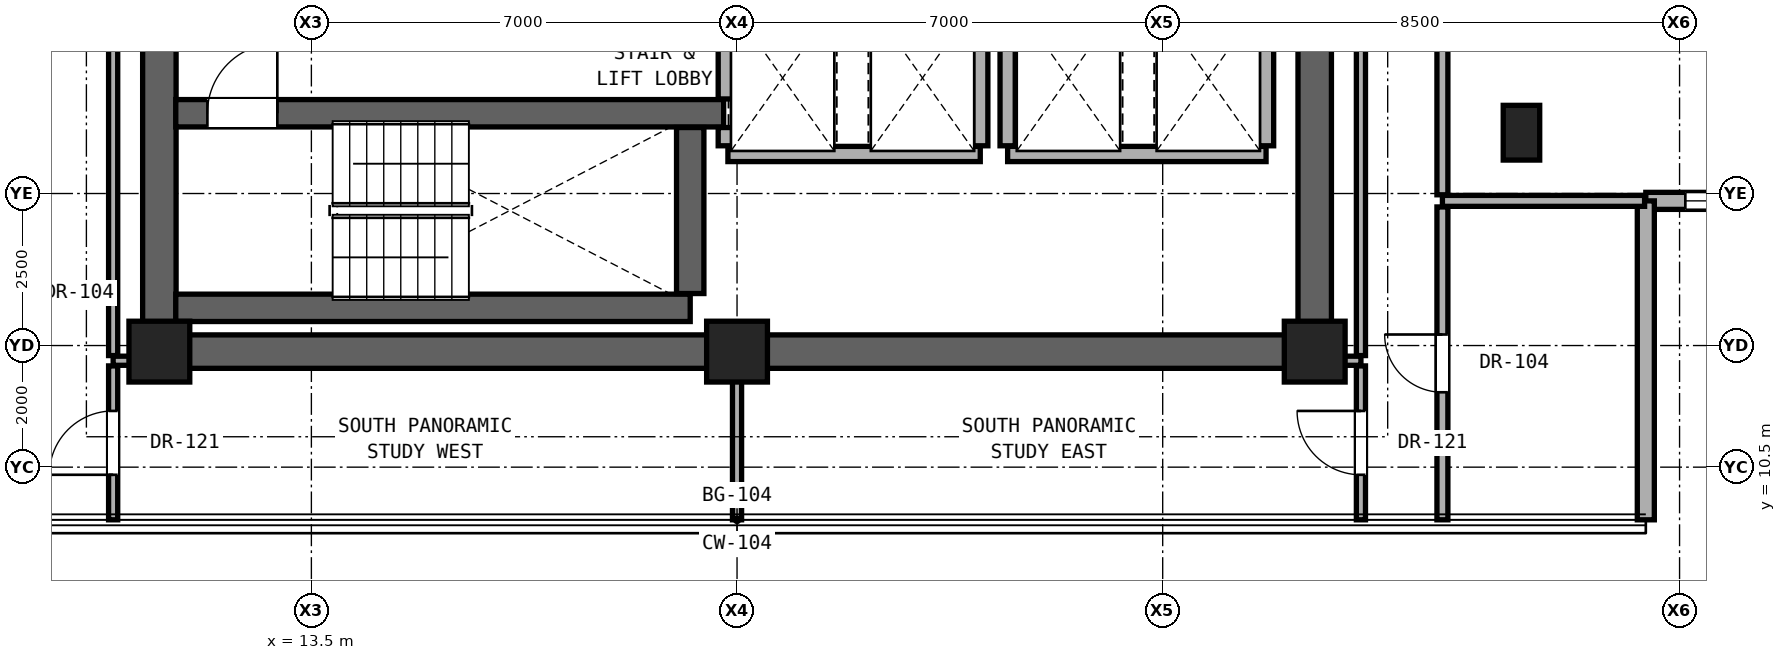
"""IFC4 building model, lengths in metres.
Left out: names, types, materials, properties, quantities, classifications, styles, units other than length and angle.
Written with IfcOpenShell. Run it as: python <this file> out.ifc"""

import sys

from ifc_helpers import new_model, si_unit, direction, frame, frame_2d, origin, origin_2d, place, context, subcontext, project, spatial, rectangle, extrude, element, fill, save


model = new_model("IFC4")
c1 = context("Model", 3, precision=1e-05, world=origin(), true_north=direction((0.0, 1.0)))
c2 = subcontext(c1, "Body", "Model", "MODEL_VIEW")
j1 = project(units=[si_unit("LENGTHUNIT", "METRE"), si_unit("PLANEANGLEUNIT", "RADIAN")], contexts=[c1])
p1 = place(None, origin())
s1 = spatial("IfcSite", under=j1, at=p1, CompositionType="ELEMENT")
p2 = place(p1, origin())
s2 = spatial("IfcBuilding", under=s1, at=p2, CompositionType="ELEMENT")
p3 = place(p2, frame((0.0, 0.0, 160.9)))
s3 = spatial("IfcBuildingStorey", under=s2, at=p3, CompositionType="ELEMENT", Elevation=160.9)
for number, where, z_axis, x_axis in (
    (1, (11.0, 12.4, 0.0), (0.0, 0.0, 1.0), (1.0, 0.0, 0.0)),
    (2, (20.5, 12.4, 0.0), (0.0, 0.0, 1.0), (1.0, 0.0, 0.0)),
    (3, (30.0, 12.4, 0.0), (0.0, 0.0, 1.0), (1.0, 0.0, 0.0)),
):
    element("IfcColumn", number, at=place(p3, frame(where, z_axis=z_axis, x_axis=x_axis)), inside=s3, PredefinedType="COLUMN", context=c2, shape_type="SweptSolid", body=[
        extrude(rectangle(XDim=1.0, YDim=1.0, at=origin_2d()), origin(), (0.0, 0.0, 1.0), 3.25),
    ])
p4 = place(p3, frame((33.4, 16.0, 0.0), z_axis=(0.0, 0.0, 1.0), x_axis=(1.0, 0.0, 0.0)))
e4 = element("IfcColumn", 4, at=p4, inside=s3, PredefinedType="PILASTER", context=c2, shape_type="SweptSolid", body=[
    extrude(rectangle(XDim=0.6, YDim=0.9, at=origin_2d()), origin(), (0.0, 0.0, 1.0), 3.25),
])
p5 = place(p3, frame((11.0, 12.4, 0.0), z_axis=(0.0, 0.0, 1.0), x_axis=(1.0, 0.0, 0.0)))
e5 = element("IfcWall", 5, at=p5, inside=s3, PredefinedType="SHEAR", context=c2, shape_type="SweptSolid", body=[
    extrude(rectangle(XDim=19.0, YDim=0.55, at=frame_2d((9.5, 0.0))), origin(), (0.0, 0.0, 1.0), 3.05),
])
for number, where, z_axis, x_axis in (
    (6, (11.0, 12.4, 0.0), (0.0, 0.0, 1.0), (0.0, 1.0, 0.0)),
    (7, (30.0, 12.4, 0.0), (0.0, 0.0, 1.0), (0.0, 1.0, 0.0)),
):
    element("IfcWall", number, at=place(p3, frame(where, z_axis=z_axis, x_axis=x_axis)), inside=s3, PredefinedType="SHEAR", context=c2, shape_type="SweptSolid", body=[
        extrude(rectangle(XDim=6.0, YDim=0.55, at=frame_2d((3.0, 0.0))), origin(), (0.0, 0.0, 1.0), 3.05),
    ])
p6 = place(p3, frame((35.445, 14.879, 0.0), z_axis=(0.0, 0.0, 1.0), x_axis=(1.0, 0.0, 0.0)))
e8 = element("IfcWall", 8, at=p6, inside=s3, PredefinedType="SOLIDWALL", context=c2, shape_type="SweptSolid", body=[
    extrude(rectangle(XDim=5.245, YDim=0.28, at=frame_2d((2.623, 0.0))), origin(), (0.0, 0.0, 1.0), 3.03),
])
p7 = place(p6, frame((0.65, 0.0, 0.85)))
e9 = element("IfcOpeningElement", 9, at=p7, cuts=e8, PredefinedType="OPENING", context=c2, shape_type="SweptSolid", body=[
    extrude(rectangle(XDim=1.1, YDim=2.0, at=frame_2d((0.55, 1.0))), frame((0.0, 0.15, 0.0), z_axis=(0.0, -1.0, 0.0), x_axis=(1.0, 0.0, 0.0)), (0.0, 0.0, 1.0), 0.3),
])
p8 = place(p3, frame((35.445, 9.634, 0.0), z_axis=(0.0, 0.0, 1.0), x_axis=(0.0, 1.0, 0.0)))
e10 = element("IfcWall", 10, at=p8, inside=s3, PredefinedType="SOLIDWALL", context=c2, shape_type="SweptSolid", body=[
    extrude(rectangle(XDim=5.245, YDim=0.28, at=frame_2d((2.623, 0.0))), origin(), (0.0, 0.0, 1.0), 3.03),
])
for number, where, z_axis, x_axis in (
    (11, (10.24, 12.25, 0.0), (0.0, 0.0, 1.0), (1.0, 0.0, 0.0)),
    (12, (30.27, 12.25, 0.0), (0.0, 0.0, 1.0), (1.0, 0.0, 0.0)),
):
    element("IfcWall", number, at=place(p3, frame(where, z_axis=z_axis, x_axis=x_axis)), inside=s3, PredefinedType="PARTITIONING", context=c2, shape_type="SweptSolid", body=[
        extrude(rectangle(XDim=0.49, YDim=0.15, at=frame_2d((0.245, 0.0))), origin(), (0.0, 0.0, 1.0), 3.05),
    ])
p9 = place(p3, frame((11.27, 13.12, 0.0), z_axis=(0.0, 0.0, 1.0), x_axis=(1.0, 0.0, 0.0)))
e13 = element("IfcWall", 13, at=p9, inside=s3, PredefinedType="SHEAR", context=c2, shape_type="SweptSolid", body=[
    extrude(rectangle(XDim=8.46, YDim=0.45, at=frame_2d((4.23, 0.0))), origin(), (0.0, 0.0, 1.0), 3.05),
])
p10 = place(p3, frame((32.1, 14.879, 0.0), z_axis=(0.0, 0.0, 1.0), x_axis=(1.0, 0.0, 0.0)))
e14 = element("IfcWall", 14, at=p10, inside=s3, PredefinedType="PARTITIONING", context=c2, shape_type="SweptSolid", body=[
    extrude(rectangle(XDim=3.325, YDim=0.18, at=frame_2d((1.663, 0.0))), origin(), (0.0, 0.0, 1.0), 3.05),
])
p11 = place(p3, frame((20.35, 15.65, 0.0), z_axis=(0.0, 0.0, 1.0), x_axis=(1.0, 0.0, 0.0)))
e15 = element("IfcWall", 15, at=p11, inside=s3, PredefinedType="SOLIDWALL", context=c2, shape_type="SweptSolid", body=[
    extrude(rectangle(XDim=4.15, YDim=0.25, at=frame_2d((2.075, 0.0))), origin(), (0.0, 0.0, 1.0), 3.05),
])
p12 = place(p3, frame((24.95, 15.65, 0.0), z_axis=(0.0, 0.0, 1.0), x_axis=(1.0, 0.0, 0.0)))
e16 = element("IfcWall", 16, at=p12, inside=s3, PredefinedType="SOLIDWALL", context=c2, shape_type="SweptSolid", body=[
    extrude(rectangle(XDim=4.25, YDim=0.25, at=frame_2d((2.125, 0.0))), origin(), (0.0, 0.0, 1.0), 3.05),
])
p13 = place(p3, frame((11.27, 16.32, 0.0), z_axis=(0.0, 0.0, 1.0), x_axis=(1.0, 0.0, 0.0)))
e17 = element("IfcWall", 17, at=p13, inside=s3, PredefinedType="SHEAR", context=c2, shape_type="SweptSolid", body=[
    extrude(rectangle(XDim=9.01, YDim=0.45, at=frame_2d((4.505, 0.0))), origin(), (0.0, 0.0, 1.0), 3.05),
])
p14 = place(p13, frame((0.52, 0.0, 0.0)))
e18 = element("IfcOpeningElement", 18, at=p14, cuts=e17, PredefinedType="OPENING", context=c2, shape_type="SweptSolid", body=[
    extrude(rectangle(XDim=1.15, YDim=2.2, at=frame_2d((0.575, 1.1))), frame((0.0, 0.235, 0.0), z_axis=(0.0, -1.0, 0.0), x_axis=(1.0, 0.0, 0.0)), (0.0, 0.0, 1.0), 0.47),
])
p15 = place(p3, frame((10.24, 9.634, 0.0), z_axis=(0.0, 0.0, 1.0), x_axis=(0.0, 1.0, 0.0)))
e19 = element("IfcWall", 19, at=p15, inside=s3, PredefinedType="PARTITIONING", context=c2, shape_type="SweptSolid", body=[
    extrude(rectangle(XDim=2.531, YDim=0.15, at=frame_2d((1.266, 0.0))), origin(), (0.0, 0.0, 1.0), 3.05),
])
p16 = place(p15, frame((0.74, 0.0, 0.0)))
e20 = element("IfcOpeningElement", 20, at=p16, cuts=e19, PredefinedType="OPENING", context=c2, shape_type="SweptSolid", body=[
    extrude(rectangle(XDim=1.05, YDim=2.2, at=frame_2d((0.525, 1.1))), frame((0.0, 0.085, 0.0), z_axis=(0.0, -1.0, 0.0), x_axis=(1.0, 0.0, 0.0)), (0.0, 0.0, 1.0), 0.17),
])
p17 = place(p3, frame((10.24, 12.335, 0.0), z_axis=(0.0, 0.0, 1.0), x_axis=(0.0, 1.0, 0.0)))
e21 = element("IfcWall", 21, at=p17, inside=s3, PredefinedType="PARTITIONING", context=c2, shape_type="SweptSolid", body=[
    extrude(rectangle(XDim=5.98, YDim=0.15, at=frame_2d((2.99, 0.0))), origin(), (0.0, 0.0, 1.0), 2.442),
])
p18 = place(p3, frame((19.73, 13.355, 0.0), z_axis=(0.0, 0.0, 1.0), x_axis=(0.0, 1.0, 0.0)))
e22 = element("IfcWall", 22, at=p18, inside=s3, PredefinedType="SHEAR", context=c2, shape_type="SweptSolid", body=[
    extrude(rectangle(XDim=2.73, YDim=0.45, at=frame_2d((1.365, 0.0))), origin(), (0.0, 0.0, 1.0), 3.05),
])
p19 = place(p3, frame((20.315, 15.785, 0.0), z_axis=(0.0, 0.0, 1.0), x_axis=(0.0, 1.0, 0.0)))
e23 = element("IfcWall", 23, at=p19, inside=s3, PredefinedType="SOLIDWALL", context=c2, shape_type="SweptSolid", body=[
    extrude(rectangle(XDim=0.3, YDim=0.25, at=frame_2d((0.15, 0.0))), origin(), (0.0, 0.0, 1.0), 3.05),
])
p20 = place(p3, frame((20.315, 16.555, 0.0), z_axis=(0.0, 0.0, 1.0), x_axis=(0.0, 1.0, 0.0)))
e24 = element("IfcWall", 24, at=p20, inside=s3, PredefinedType="SOLIDWALL", context=c2, shape_type="SweptSolid", body=[
    extrude(rectangle(XDim=1.575, YDim=0.25, at=frame_2d((0.788, 0.0))), origin(), (0.0, 0.0, 1.0), 3.05),
])
p21 = place(p3, frame((20.5, 9.634, 0.0), z_axis=(0.0, 0.0, 1.0), x_axis=(0.0, 1.0, 0.0)))
e25 = element("IfcWall", 25, at=p21, inside=s3, PredefinedType="PARTITIONING", context=c2, shape_type="SweptSolid", body=[
    extrude(rectangle(XDim=2.496, YDim=0.15, at=frame_2d((1.248, 0.0))), origin(), (0.0, 0.0, 1.0), 3.05),
])
for number, where, z_axis, x_axis in (
    (26, (24.5, 15.785, 0.0), (0.0, 0.0, 1.0), (0.0, 1.0, 0.0)),
    (27, (24.95, 15.785, 0.0), (0.0, 0.0, 1.0), (0.0, 1.0, 0.0)),
    (28, (29.2, 15.785, 0.0), (0.0, 0.0, 1.0), (0.0, 1.0, 0.0)),
):
    element("IfcWall", number, at=place(p3, frame(where, z_axis=z_axis, x_axis=x_axis)), inside=s3, PredefinedType="SOLIDWALL", context=c2, shape_type="SweptSolid", body=[
        extrude(rectangle(XDim=2.345, YDim=0.25, at=frame_2d((1.172, 0.0))), origin(), (0.0, 0.0, 1.0), 3.05),
    ])
p22 = place(p3, frame((30.76, 9.634, 0.0), z_axis=(0.0, 0.0, 1.0), x_axis=(0.0, 1.0, 0.0)))
e29 = element("IfcWall", 29, at=p22, inside=s3, PredefinedType="PARTITIONING", context=c2, shape_type="SweptSolid", body=[
    extrude(rectangle(XDim=2.531, YDim=0.15, at=frame_2d((1.266, 0.0))), origin(), (0.0, 0.0, 1.0), 3.05),
])
p23 = place(p22, frame((0.74, 0.0, 0.0)))
e30 = element("IfcOpeningElement", 30, at=p23, cuts=e29, PredefinedType="OPENING", context=c2, shape_type="SweptSolid", body=[
    extrude(rectangle(XDim=1.05, YDim=2.2, at=frame_2d((0.525, 1.1))), frame((0.0, 0.085, 0.0), z_axis=(0.0, -1.0, 0.0), x_axis=(1.0, 0.0, 0.0)), (0.0, 0.0, 1.0), 0.17),
])
p24 = place(p3, frame((30.76, 12.335, 0.0), z_axis=(0.0, 0.0, 1.0), x_axis=(0.0, 1.0, 0.0)))
e31 = element("IfcWall", 31, at=p24, inside=s3, PredefinedType="PARTITIONING", context=c2, shape_type="SweptSolid", body=[
    extrude(rectangle(XDim=5.98, YDim=0.15, at=frame_2d((2.99, 0.0))), origin(), (0.0, 0.0, 1.0), 2.442),
])
p25 = place(p3, frame((32.1, 9.634, 0.0), z_axis=(0.0, 0.0, 1.0), x_axis=(0.0, 1.0, 0.0)))
e32 = element("IfcWall", 32, at=p25, inside=s3, PredefinedType="PARTITIONING", context=c2, shape_type="SweptSolid", body=[
    extrude(rectangle(XDim=5.145, YDim=0.18, at=frame_2d((2.573, 0.0))), origin(), (0.0, 0.0, 1.0), 3.05),
])
p26 = place(p25, frame((2.097, 0.0, 0.0)))
e33 = element("IfcOpeningElement", 33, at=p26, cuts=e32, PredefinedType="OPENING", context=c2, shape_type="SweptSolid", body=[
    extrude(rectangle(XDim=0.95, YDim=2.15, at=frame_2d((0.475, 1.075))), frame((0.0, 0.1, 0.0), z_axis=(0.0, -1.0, 0.0), x_axis=(1.0, 0.0, 0.0)), (0.0, 0.0, 1.0), 0.2),
])
p27 = place(p3, frame((32.1, 14.979, 0.0), z_axis=(0.0, 0.0, 1.0), x_axis=(0.0, 1.0, 0.0)))
e34 = element("IfcWall", 34, at=p27, inside=s3, PredefinedType="PARTITIONING", context=c2, shape_type="SweptSolid", body=[
    extrude(rectangle(XDim=7.421, YDim=0.18, at=frame_2d((3.71, 0.0))), origin(), (0.0, 0.0, 1.0), 2.442),
])
p28 = place(p27, frame((3.186, 0.0, 0.0)))
e35 = element("IfcOpeningElement", 35, at=p28, cuts=e34, PredefinedType="OPENING", context=c2, shape_type="SweptSolid", body=[
    extrude(rectangle(XDim=1.05, YDim=2.2, at=frame_2d((0.525, 1.1))), frame((0.0, 0.1, 0.0), z_axis=(0.0, -1.0, 0.0), x_axis=(1.0, 0.0, 0.0)), (0.0, 0.0, 1.0), 0.2),
])
p29 = place(p7, origin())
e36 = element("IfcWindow", 36, at=p29, inside=s3, PartitioningType="SINGLE_PANEL", PredefinedType="WINDOW", context=c2, shape_type="SweptSolid", body=[
    extrude(rectangle(XDim=1.1, YDim=2.0, at=frame_2d((0.55, 1.0))), frame((0.0, 0.03, 0.0), z_axis=(0.0, -1.0, 0.0), x_axis=(1.0, 0.0, 0.0)), (0.0, 0.0, 1.0), 0.06),
])
fill(e9, e36)
p30 = place(p14, origin())
e37 = element("IfcDoor", 37, at=p30, inside=s3, OperationType="SINGLE_SWING_RIGHT", PredefinedType="DOOR", context=c2, shape_type="SweptSolid", body=[
    extrude(rectangle(XDim=1.15, YDim=2.2, at=frame_2d((0.575, 1.1))), frame((0.0, 0.025, 0.0), z_axis=(0.0, -1.0, 0.0), x_axis=(1.0, 0.0, 0.0)), (0.0, 0.0, 1.0), 0.05),
])
fill(e18, e37)
p31 = place(p16, origin())
e38 = element("IfcDoor", 38, at=p31, inside=s3, OperationType="SINGLE_SWING_LEFT", PredefinedType="DOOR", context=c2, shape_type="SweptSolid", body=[
    extrude(rectangle(XDim=1.05, YDim=2.2, at=frame_2d((0.525, 1.1))), frame((0.0, 0.025, 0.0), z_axis=(0.0, -1.0, 0.0), x_axis=(1.0, 0.0, 0.0)), (0.0, 0.0, 1.0), 0.05),
])
fill(e20, e38)
p32 = place(p23, origin())
e39 = element("IfcDoor", 39, at=p32, inside=s3, OperationType="SINGLE_SWING_RIGHT", PredefinedType="DOOR", context=c2, shape_type="SweptSolid", body=[
    extrude(rectangle(XDim=1.05, YDim=2.2, at=frame_2d((0.525, 1.1))), frame((0.0, 0.025, 0.0), z_axis=(0.0, -1.0, 0.0), x_axis=(1.0, 0.0, 0.0)), (0.0, 0.0, 1.0), 0.05),
])
fill(e30, e39)
p33 = place(p26, origin())
e40 = element("IfcDoor", 40, at=p33, inside=s3, OperationType="SINGLE_SWING_RIGHT", PredefinedType="DOOR", context=c2, shape_type="SweptSolid", body=[
    extrude(rectangle(XDim=0.95, YDim=2.15, at=frame_2d((0.475, 1.075))), frame((0.0, 0.025, 0.0), z_axis=(0.0, -1.0, 0.0), x_axis=(1.0, 0.0, 0.0)), (0.0, 0.0, 1.0), 0.05),
])
fill(e33, e40)
save(model, sys.argv[1])
